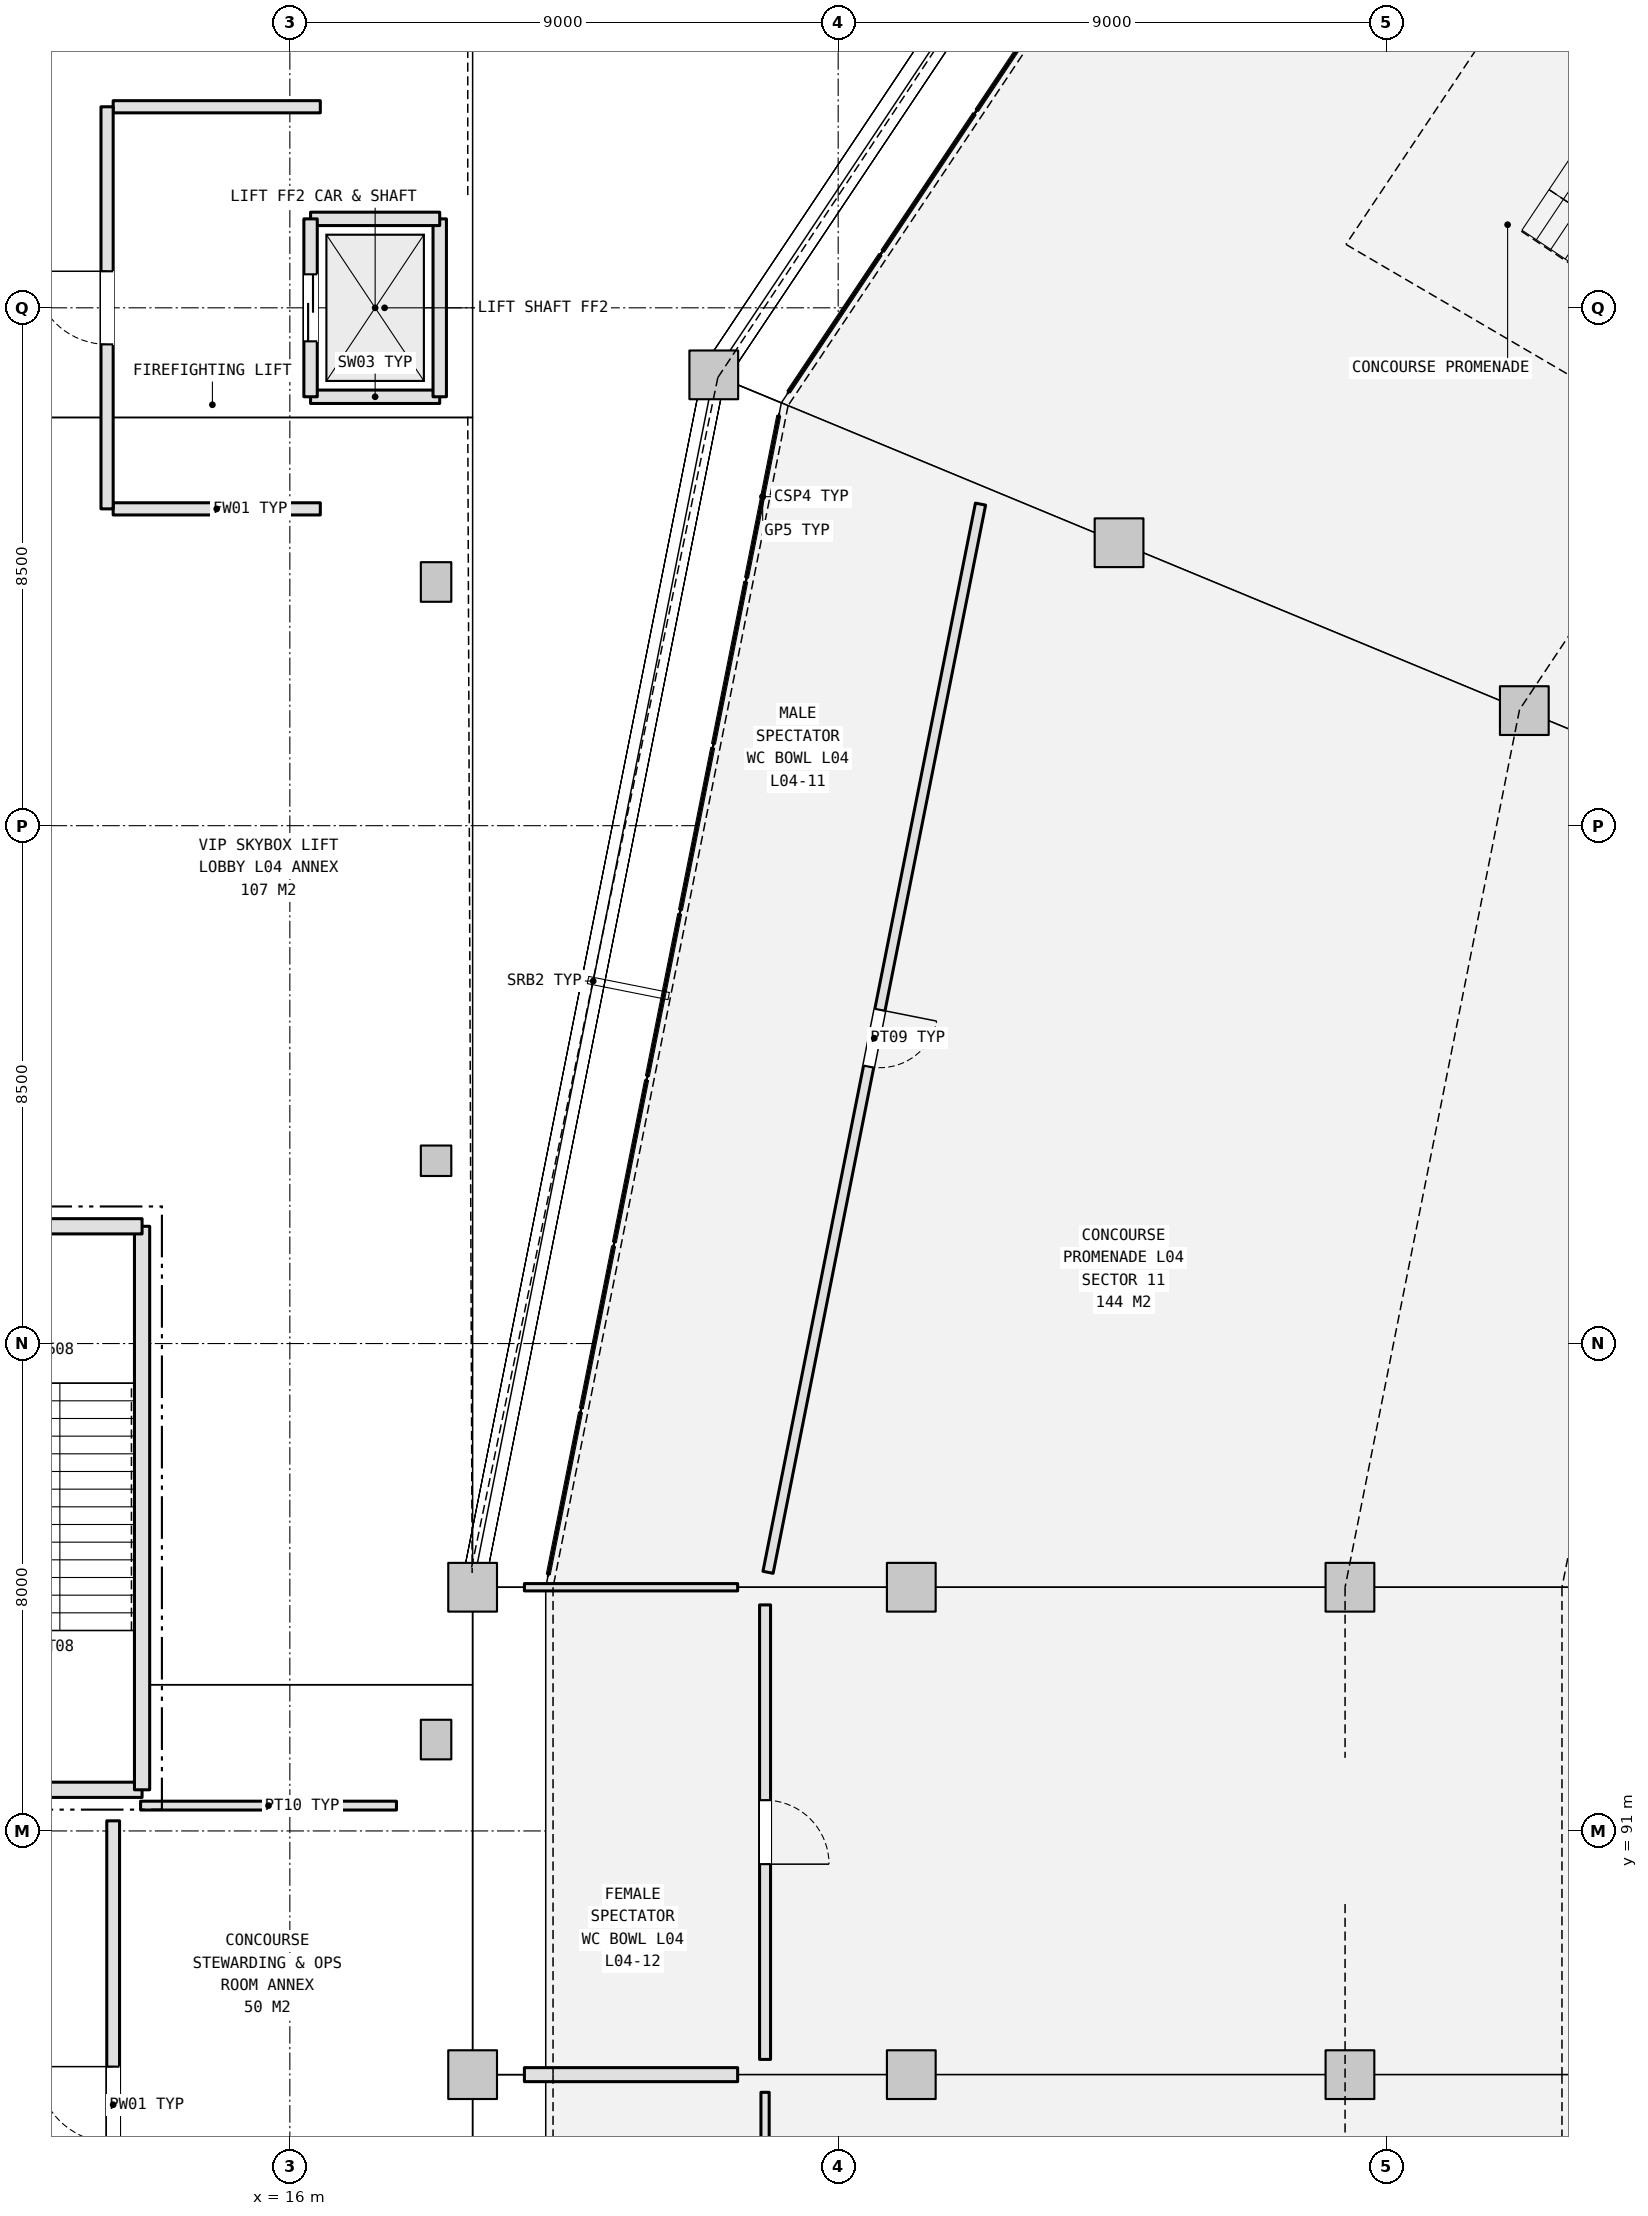
"""IFC4 building model, lengths in metres.
Left out: names, types, materials, properties, quantities, classifications, styles, units other than length and angle.
Written with IfcOpenShell. Run it as: python <this file> out.ifc"""

import sys

from ifc_helpers import new_model, si_unit, direction, frame, frame_2d, origin, origin_2d, place, context, subcontext, project, spatial, rectangle, extrude, element, fill, save


model = new_model("IFC4")
c1 = context("Model", 3, precision=1e-05, world=origin(), true_north=direction((0.0, 1.0)))
c2 = subcontext(c1, "Body", "Model", "MODEL_VIEW")
j1 = project(units=[si_unit("LENGTHUNIT", "METRE"), si_unit("PLANEANGLEUNIT", "RADIAN")], contexts=[c1])
p1 = place(None, origin())
s1 = spatial("IfcSite", under=j1, at=p1, CompositionType="ELEMENT")
p2 = place(p1, origin())
s2 = spatial("IfcBuilding", under=s1, at=p2, CompositionType="ELEMENT")
p3 = place(p2, frame((0.0, 0.0, 21.6)))
s3 = spatial("IfcBuildingStorey", under=s2, at=p3, CompositionType="ELEMENT", Elevation=21.6)
for number, where, z_axis, x_axis in (
    (1, (36.262, 109.389, 0.0), (0.0, 0.0, 1.0), (1.0, 0.0, 0.0)),
    (2, (29.61, 112.144, 0.0), (0.0, 0.0, 1.0), (1.0, 0.0, 0.0)),
    (3, (22.958, 114.9, 0.0), (0.0, 0.0, 1.0), (1.0, 0.0, 0.0)),
    (4, (33.4, 95.0, 0.0), (0.0, 0.0, 1.0), (1.0, 0.0, 0.0)),
    (5, (26.2, 95.0, 0.0), (0.0, 0.0, 1.0), (1.0, 0.0, 0.0)),
    (6, (19.0, 95.0, 0.0), (0.0, 0.0, 1.0), (1.0, 0.0, 0.0)),
    (7, (33.4, 87.0, 0.0), (0.0, 0.0, 1.0), (1.0, 0.0, 0.0)),
    (8, (26.2, 87.0, 0.0), (0.0, 0.0, 1.0), (1.0, 0.0, 0.0)),
    (9, (19.0, 87.0, 0.0), (0.0, 0.0, 1.0), (1.0, 0.0, 0.0)),
):
    element("IfcColumn", number, at=place(p3, frame(where, z_axis=z_axis, x_axis=x_axis)), inside=s3, PredefinedType="COLUMN", context=c2, shape_type="SweptSolid", body=[
        extrude(rectangle(XDim=0.8, YDim=0.8, at=origin_2d()), origin(), (0.0, 0.0, 1.0), 5.4),
    ])
p4 = place(p3, frame((18.4, 92.5, 0.0), z_axis=(0.0, 0.0, 1.0), x_axis=(1.0, 0.0, 0.0)))
e10 = element("IfcColumn", 10, at=p4, inside=s3, PredefinedType="COLUMN", context=c2, shape_type="SweptSolid", body=[
    extrude(rectangle(XDim=0.5, YDim=0.65, at=origin_2d()), origin(), (0.0, 0.0, 1.0), 5.4),
])
p5 = place(p3, frame((18.4, 102.0, 0.0), z_axis=(0.0, 0.0, 1.0), x_axis=(1.0, 0.0, 0.0)))
e11 = element("IfcColumn", 11, at=p5, inside=s3, PredefinedType="COLUMN", context=c2, shape_type="SweptSolid", body=[
    extrude(rectangle(XDim=0.5, YDim=0.5, at=origin_2d()), origin(), (0.0, 0.0, 1.0), 5.4),
])
p6 = place(p3, frame((18.4, 111.5, 0.0), z_axis=(0.0, 0.0, 1.0), x_axis=(1.0, 0.0, 0.0)))
e12 = element("IfcColumn", 12, at=p6, inside=s3, PredefinedType="COLUMN", context=c2, shape_type="SweptSolid", body=[
    extrude(rectangle(XDim=0.5, YDim=0.65, at=origin_2d()), origin(), (0.0, 0.0, 1.0), 5.4),
])
p7 = place(p3, frame((8.275, 91.675, 0.0), z_axis=(0.0, 0.0, 1.0), x_axis=(1.0, 0.0, 0.0)))
e13 = element("IfcWall", 13, at=p7, inside=s3, PredefinedType="SHEAR", context=c2, shape_type="SweptSolid", body=[
    extrude(rectangle(XDim=5.299, YDim=0.25, at=frame_2d((2.65, 0.0))), origin(), (0.0, 0.0, 1.0), 5.15),
])
p8 = place(p3, frame((13.575, 91.675, 0.0), z_axis=(0.0, 0.0, 1.0), x_axis=(0.0, 1.0, 0.0)))
e14 = element("IfcWall", 14, at=p8, inside=s3, PredefinedType="SHEAR", context=c2, shape_type="SweptSolid", body=[
    extrude(rectangle(XDim=9.249, YDim=0.25, at=frame_2d((4.625, 0.0))), origin(), (0.0, 0.0, 1.0), 5.15),
])
p9 = place(p3, frame((13.575, 100.925, 0.0), z_axis=(0.0, 0.0, 1.0), x_axis=(-1.0, 0.0, 0.0)))
e15 = element("IfcWall", 15, at=p9, inside=s3, PredefinedType="SHEAR", context=c2, shape_type="SweptSolid", body=[
    extrude(rectangle(XDim=5.299, YDim=0.25, at=frame_2d((2.65, 0.0))), origin(), (0.0, 0.0, 1.0), 5.15),
])
p10 = place(p9, frame((1.9, 0.0, 0.0)))
e16 = element("IfcOpeningElement", 16, at=p10, cuts=e15, PredefinedType="OPENING", context=c2, shape_type="SweptSolid", body=[
    extrude(rectangle(XDim=1.5, YDim=2.2, at=frame_2d((0.75, 1.1))), frame((0.0, 0.135, 0.0), z_axis=(0.0, -1.0, 0.0), x_axis=(1.0, 0.0, 0.0)), (0.0, 0.0, 1.0), 0.27),
])
p11 = place(p3, frame((16.34, 114.54, 0.0), z_axis=(0.0, 0.0, 1.0), x_axis=(1.0, 0.0, 0.0)))
e17 = element("IfcWall", 17, at=p11, inside=s3, PredefinedType="SHEAR", context=c2, shape_type="SweptSolid", body=[
    extrude(rectangle(XDim=2.12, YDim=0.22, at=frame_2d((1.06, 0.0))), origin(), (0.0, 0.0, 1.0), 5.15),
])
p12 = place(p3, frame((18.46, 114.54, 0.0), z_axis=(0.0, 0.0, 1.0), x_axis=(0.0, 1.0, 0.0)))
e18 = element("IfcWall", 18, at=p12, inside=s3, PredefinedType="SHEAR", context=c2, shape_type="SweptSolid", body=[
    extrude(rectangle(XDim=2.92, YDim=0.22, at=frame_2d((1.46, 0.0))), origin(), (0.0, 0.0, 1.0), 5.15),
])
p13 = place(p3, frame((18.46, 117.46, 0.0), z_axis=(0.0, 0.0, 1.0), x_axis=(-1.0, 0.0, 0.0)))
e19 = element("IfcWall", 19, at=p13, inside=s3, PredefinedType="SHEAR", context=c2, shape_type="SweptSolid", body=[
    extrude(rectangle(XDim=2.12, YDim=0.22, at=frame_2d((1.06, 0.0))), origin(), (0.0, 0.0, 1.0), 5.15),
])
p14 = place(p3, frame((16.34, 117.46, 0.0), z_axis=(0.0, 0.0, 1.0), x_axis=(0.0, -1.0, 0.0)))
e20 = element("IfcWall", 20, at=p14, inside=s3, PredefinedType="SHEAR", context=c2, shape_type="SweptSolid", body=[
    extrude(rectangle(XDim=2.92, YDim=0.22, at=frame_2d((1.46, 0.0))), origin(), (0.0, 0.0, 1.0), 5.15),
])
p15 = place(p14, frame((0.91, 0.0, 0.0)))
e21 = element("IfcOpeningElement", 21, at=p15, cuts=e20, PredefinedType="OPENING", context=c2, shape_type="SweptSolid", body=[
    extrude(rectangle(XDim=1.1, YDim=2.2, at=frame_2d((0.55, 1.1))), frame((0.0, 0.12, 0.0), z_axis=(0.0, -1.0, 0.0), x_axis=(1.0, 0.0, 0.0)), (0.0, 0.0, 1.0), 0.24),
])
for number, where, z_axis, x_axis in (
    (22, (13.1, 112.7, 0.0), (0.0, 0.0, 1.0), (1.0, 0.0, 0.0)),
    (23, (16.5, 119.3, 0.0), (0.0, 0.0, 1.0), (-1.0, 0.0, 0.0)),
):
    element("IfcWall", number, at=place(p3, frame(where, z_axis=z_axis, x_axis=x_axis)), inside=s3, PredefinedType="SOLIDWALL", context=c2, shape_type="SweptSolid", body=[
        extrude(rectangle(XDim=3.4, YDim=0.2, at=frame_2d((1.7, 0.0))), origin(), (0.0, 0.0, 1.0), 5.12),
    ])
p16 = place(p3, frame((13.0, 119.3, 0.0), z_axis=(0.0, 0.0, 1.0), x_axis=(0.0, -1.0, 0.0)))
e24 = element("IfcWall", 24, at=p16, inside=s3, PredefinedType="SOLIDWALL", context=c2, shape_type="SweptSolid", body=[
    extrude(rectangle(XDim=6.6, YDim=0.2, at=frame_2d((3.3, 0.0))), origin(), (0.0, 0.0, 1.0), 5.12),
])
p17 = place(p16, frame((2.7, 0.0, 0.0)))
e25 = element("IfcOpeningElement", 25, at=p17, cuts=e24, PredefinedType="OPENING", context=c2, shape_type="SweptSolid", body=[
    extrude(rectangle(XDim=1.2, YDim=2.2, at=frame_2d((0.6, 1.1))), frame((0.0, 0.11, 0.0), z_axis=(0.0, -1.0, 0.0), x_axis=(1.0, 0.0, 0.0)), (0.0, 0.0, 1.0), 0.22),
])
p18 = place(p3, frame((13.1, 81.847, 0.0), z_axis=(0.0, 0.0, 1.0), x_axis=(0.0, 1.0, 0.0)))
e26 = element("IfcWall", 26, at=p18, inside=s3, PredefinedType="PLUMBINGWALL", context=c2, shape_type="SweptSolid", body=[
    extrude(rectangle(XDim=9.319, YDim=0.21, at=frame_2d((4.66, 0.0))), origin(), (0.0, 0.0, 1.0), 4.666),
])
p19 = place(p18, frame((4.034, 0.0, 0.0)))
e27 = element("IfcOpeningElement", 27, at=p19, cuts=e26, PredefinedType="OPENING", context=c2, shape_type="SweptSolid", body=[
    extrude(rectangle(XDim=1.25, YDim=2.2, at=frame_2d((0.625, 1.1))), frame((0.0, 0.115, 0.0), z_axis=(0.0, -1.0, 0.0), x_axis=(1.0, 0.0, 0.0)), (0.0, 0.0, 1.0), 0.23),
])
p20 = place(p3, frame((13.55, 91.416, 0.0), z_axis=(0.0, 0.0, 1.0), x_axis=(1.0, 0.0, 0.0)))
e28 = element("IfcWall", 28, at=p20, inside=s3, PredefinedType="PARTITIONING", context=c2, shape_type="SweptSolid", body=[
    extrude(rectangle(XDim=4.2, YDim=0.145, at=frame_2d((2.1, 0.0))), origin(), (0.0, 0.0, 1.0), 5.12),
])
p21 = place(p3, frame((27.336, 112.778, 0.0), z_axis=(0.0, 0.0, 1.0), x_axis=(-0.195075994915, -0.980788130132, 0.0)))
e29 = element("IfcWall", 29, at=p21, inside=s3, PredefinedType="PARTITIONING", context=c2, shape_type="SweptSolid", body=[
    extrude(rectangle(XDim=17.877, YDim=0.17, at=frame_2d((8.938, 0.0))), origin(), (0.0, 0.0, 1.0), 2.772),
])
p22 = place(p21, frame((8.463, 0.0, 0.0)))
e30 = element("IfcOpeningElement", 30, at=p22, cuts=e29, PredefinedType="OPENING", context=c2, shape_type="SweptSolid", body=[
    extrude(rectangle(XDim=0.95, YDim=2.15, at=frame_2d((0.475, 1.075))), frame((0.0, 0.095, 0.0), z_axis=(0.0, -1.0, 0.0), x_axis=(1.0, 0.0, 0.0)), (0.0, 0.0, 1.0), 0.19),
])
p23 = place(p3, frame((23.35, 95.0, 0.0), z_axis=(0.0, 0.0, 1.0), x_axis=(-1.0, 0.0, 0.0)))
e31 = element("IfcWall", 31, at=p23, inside=s3, PredefinedType="PARTITIONING", context=c2, shape_type="SweptSolid", body=[
    extrude(rectangle(XDim=3.5, YDim=0.12, at=frame_2d((1.75, 0.0))), origin(), (0.0, 0.0, 1.0), 2.772),
])
p24 = place(p3, frame((23.8, 94.71, 0.0), z_axis=(0.0, 0.0, 1.0), x_axis=(0.0, -1.0, 0.0)))
e32 = element("IfcWall", 32, at=p24, inside=s3, PredefinedType="PARTITIONING", context=c2, shape_type="SweptSolid", body=[
    extrude(rectangle(XDim=7.46, YDim=0.18, at=frame_2d((3.73, 0.0))), origin(), (0.0, 0.0, 1.0), 2.772),
])
p25 = place(p24, frame((3.205, 0.0, 0.0)))
e33 = element("IfcOpeningElement", 33, at=p25, cuts=e32, PredefinedType="OPENING", context=c2, shape_type="SweptSolid", body=[
    extrude(rectangle(XDim=1.05, YDim=2.2, at=frame_2d((0.525, 1.1))), frame((0.0, 0.1, 0.0), z_axis=(0.0, -1.0, 0.0), x_axis=(1.0, 0.0, 0.0)), (0.0, 0.0, 1.0), 0.2),
])
p26 = place(p3, frame((23.35, 87.0, 0.0), z_axis=(0.0, 0.0, 1.0), x_axis=(-1.0, 0.0, 0.0)))
e34 = element("IfcWall", 34, at=p26, inside=s3, PredefinedType="PLUMBINGWALL", context=c2, shape_type="SweptSolid", body=[
    extrude(rectangle(XDim=3.5, YDim=0.23, at=frame_2d((1.75, 0.0))), origin(), (0.0, 0.0, 1.0), 2.772),
])
p27 = place(p3, frame((23.8, 86.71, 0.0), z_axis=(0.0, 0.0, 1.0), x_axis=(0.0, -1.0, 0.0)))
e35 = element("IfcWall", 35, at=p27, inside=s3, PredefinedType="PARTITIONING", context=c2, shape_type="SweptSolid", body=[
    extrude(rectangle(XDim=7.46, YDim=0.135, at=frame_2d((3.73, 0.0))), origin(), (0.0, 0.0, 1.0), 2.772),
])
p28 = place(p27, frame((3.105, 0.0, 0.0)))
e36 = element("IfcOpeningElement", 36, at=p28, cuts=e35, PredefinedType="OPENING", context=c2, shape_type="SweptSolid", body=[
    extrude(rectangle(XDim=1.25, YDim=2.2, at=frame_2d((0.625, 1.1))), frame((0.0, 0.077, 0.0), z_axis=(0.0, -1.0, 0.0), x_axis=(1.0, 0.0, 0.0)), (0.0, 0.0, 1.0), 0.155),
])
p29 = place(p15, origin())
e37 = element("IfcDoor", 37, at=p29, inside=s3, OperationType="DOUBLE_DOOR_SLIDING", PredefinedType="DOOR", context=c2, shape_type="SweptSolid", body=[
    extrude(rectangle(XDim=1.1, YDim=2.2, at=frame_2d((0.55, 1.1))), frame((0.0, 0.025, 0.0), z_axis=(0.0, -1.0, 0.0), x_axis=(1.0, 0.0, 0.0)), (0.0, 0.0, 1.0), 0.05),
])
fill(e21, e37)
p30 = place(p17, frame((1.2, 0.0, 0.0), z_axis=(0.0, 0.0, 1.0), x_axis=(-1.0, 0.0, 0.0)))
e38 = element("IfcDoor", 38, at=p30, inside=s3, OperationType="SINGLE_SWING_LEFT", PredefinedType="DOOR", context=c2, shape_type="SweptSolid", body=[
    extrude(rectangle(XDim=1.2, YDim=2.2, at=frame_2d((0.6, 1.1))), frame((0.0, 0.025, 0.0), z_axis=(0.0, -1.0, 0.0), x_axis=(1.0, 0.0, 0.0)), (0.0, 0.0, 1.0), 0.05),
])
fill(e25, e38)
p31 = place(p19, origin())
e39 = element("IfcDoor", 39, at=p31, inside=s3, OperationType="SINGLE_SWING_RIGHT", PredefinedType="DOOR", context=c2, shape_type="SweptSolid", body=[
    extrude(rectangle(XDim=1.25, YDim=2.2, at=frame_2d((0.625, 1.1))), frame((0.0, 0.025, 0.0), z_axis=(0.0, -1.0, 0.0), x_axis=(1.0, 0.0, 0.0)), (0.0, 0.0, 1.0), 0.05),
])
fill(e27, e39)
p32 = place(p22, origin())
e40 = element("IfcDoor", 40, at=p32, inside=s3, OperationType="SINGLE_SWING_LEFT", PredefinedType="DOOR", context=c2, shape_type="SweptSolid", body=[
    extrude(rectangle(XDim=0.95, YDim=2.15, at=frame_2d((0.475, 1.075))), frame((0.0, 0.025, 0.0), z_axis=(0.0, -1.0, 0.0), x_axis=(1.0, 0.0, 0.0)), (0.0, 0.0, 1.0), 0.05),
])
fill(e30, e40)
p33 = place(p25, origin())
e41 = element("IfcDoor", 41, at=p33, inside=s3, OperationType="SINGLE_SWING_RIGHT", PredefinedType="DOOR", context=c2, shape_type="SweptSolid", body=[
    extrude(rectangle(XDim=1.05, YDim=2.2, at=frame_2d((0.525, 1.1))), frame((0.0, 0.025, 0.0), z_axis=(0.0, -1.0, 0.0), x_axis=(1.0, 0.0, 0.0)), (0.0, 0.0, 1.0), 0.05),
])
fill(e33, e41)
save(model, sys.argv[1])
